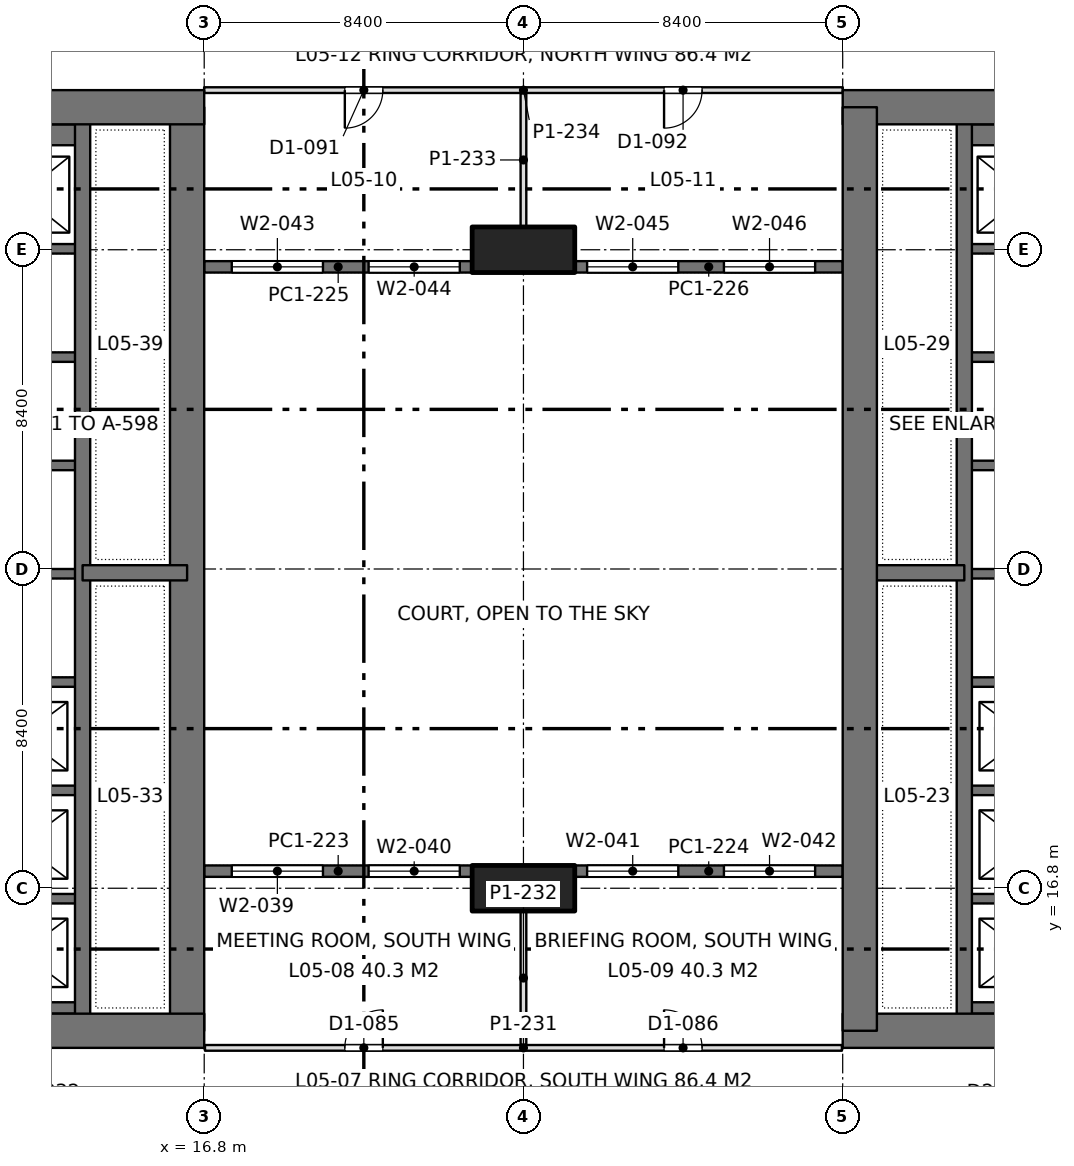
"""IFC4 building model, lengths in metres.
Left out: names, types, materials, properties, quantities, classifications, styles, units other than length and angle.
Written with IfcOpenShell. Run it as: python <this file> out.ifc"""

import sys

from ifc_helpers import new_model, si_unit, direction, frame, frame_2d, origin, origin_2d, place, context, subcontext, project, spatial, rectangle, extrude, element, fill, save


model = new_model("IFC4")
c1 = context("Model", 3, precision=1e-05, world=origin(), true_north=direction((0.0, 1.0)))
c2 = subcontext(c1, "Body", "Model", "MODEL_VIEW")
j1 = project(units=[si_unit("LENGTHUNIT", "METRE"), si_unit("PLANEANGLEUNIT", "RADIAN")], contexts=[c1])
p1 = place(None, origin())
s1 = spatial("IfcSite", under=j1, at=p1, CompositionType="ELEMENT")
p2 = place(p1, origin())
s2 = spatial("IfcBuilding", under=s1, at=p2, CompositionType="ELEMENT")
p3 = place(p2, frame((0.0, 0.0, 23.4)))
s3 = spatial("IfcBuildingStorey", under=s2, at=p3, CompositionType="ELEMENT", Elevation=23.4)
for number, where, z_axis, x_axis in (
    (1, (25.2, 16.8, 0.0), (0.0, 0.0, 1.0), (1.0, 0.0, 0.0)),
    (2, (25.2, 33.6, 0.0), (0.0, 0.0, 1.0), (1.0, 0.0, 0.0)),
):
    element("IfcColumn", number, at=place(p3, frame(where, z_axis=z_axis, x_axis=x_axis)), inside=s3, PredefinedType="COLUMN", context=c2, shape_type="SweptSolid", body=[
        extrude(rectangle(XDim=2.7, YDim=1.2, at=origin_2d()), origin(), (0.0, 0.0, 1.0), 4.5),
    ])
p4 = place(p3, frame((-1.2, 13.05, 0.0), z_axis=(0.0, 0.0, 1.0), x_axis=(1.0, 0.0, 0.0)))
e3 = element("IfcWall", 3, at=p4, inside=s3, PredefinedType="SHEAR", context=c2, shape_type="SweptSolid", body=[
    extrude(rectangle(XDim=18.0, YDim=0.9, at=frame_2d((9.0, 0.0))), origin(), (0.0, 0.0, 1.0), 4.5),
])
p5 = place(p4, frame((8.95, 0.0, 0.0)))
e4 = element("IfcOpeningElement", 4, at=p5, cuts=e3, PredefinedType="OPENING", context=c2, shape_type="SweptSolid", body=[
    extrude(rectangle(XDim=1.8, YDim=2.4, at=frame_2d((0.9, 1.2))), frame((0.0, 0.46, 0.0), z_axis=(0.0, -1.0, 0.0), x_axis=(1.0, 0.0, 0.0)), (0.0, 0.0, 1.0), 0.92),
])
p6 = place(p3, frame((-1.2, 37.35, 0.0), z_axis=(0.0, 0.0, 1.0), x_axis=(1.0, 0.0, 0.0)))
e5 = element("IfcWall", 5, at=p6, inside=s3, PredefinedType="SHEAR", context=c2, shape_type="SweptSolid", body=[
    extrude(rectangle(XDim=18.0, YDim=0.9, at=frame_2d((9.0, 0.0))), origin(), (0.0, 0.0, 1.0), 4.5),
])
p7 = place(p6, frame((8.95, 0.0, 0.0)))
e6 = element("IfcOpeningElement", 6, at=p7, cuts=e5, PredefinedType="OPENING", context=c2, shape_type="SweptSolid", body=[
    extrude(rectangle(XDim=1.8, YDim=2.4, at=frame_2d((0.9, 1.2))), frame((0.0, 0.46, 0.0), z_axis=(0.0, -1.0, 0.0), x_axis=(1.0, 0.0, 0.0)), (0.0, 0.0, 1.0), 0.92),
])
p8 = place(p3, frame((16.35, 13.05, 0.0), z_axis=(0.0, 0.0, 1.0), x_axis=(0.0, 1.0, 0.0)))
e7 = element("IfcWall", 7, at=p8, inside=s3, PredefinedType="SHEAR", context=c2, shape_type="SweptSolid", body=[
    extrude(rectangle(XDim=24.3, YDim=0.9, at=frame_2d((12.15, 0.0))), origin(), (0.0, 0.0, 1.0), 4.5),
])
p9 = place(p3, frame((13.6, 13.05, 0.0), z_axis=(0.0, 0.0, 1.0), x_axis=(0.0, 1.0, 0.0)))
e8 = element("IfcWall", 8, at=p9, inside=s3, PredefinedType="SHEAR", context=c2, shape_type="SweptSolid", body=[
    extrude(rectangle(XDim=24.3, YDim=0.4, at=frame_2d((12.15, 0.0))), origin(), (0.0, 0.0, 1.0), 4.5),
])
p10 = place(p3, frame((13.6, 25.1, 0.0), z_axis=(0.0, 0.0, 1.0), x_axis=(1.0, 0.0, 0.0)))
e9 = element("IfcWall", 9, at=p10, inside=s3, PredefinedType="SHEAR", context=c2, shape_type="SweptSolid", body=[
    extrude(rectangle(XDim=2.75, YDim=0.4, at=frame_2d((1.375, 0.0))), origin(), (0.0, 0.0, 1.0), 4.5),
])
p11 = place(p3, frame((10.4, 13.65, 0.0), z_axis=(0.0, 0.0, 1.0), x_axis=(1.0, 0.0, 0.0)))
e10 = element("IfcWall", 10, at=p11, inside=s3, PredefinedType="SHEAR", context=c2, shape_type="SweptSolid", body=[
    extrude(rectangle(XDim=3.2, YDim=0.3, at=frame_2d((1.6, 0.0))), origin(), (0.0, 0.0, 1.0), 4.5),
])
for number, where, z_axis, x_axis in (
    (11, (10.4, 16.525, 0.0), (0.0, 0.0, 1.0), (1.0, 0.0, 0.0)),
    (12, (10.4, 19.375, 0.0), (0.0, 0.0, 1.0), (1.0, 0.0, 0.0)),
    (13, (10.4, 22.225, 0.0), (0.0, 0.0, 1.0), (1.0, 0.0, 0.0)),
    (14, (10.4, 25.075, 0.0), (0.0, 0.0, 1.0), (1.0, 0.0, 0.0)),
    (15, (10.4, 27.925, 0.0), (0.0, 0.0, 1.0), (1.0, 0.0, 0.0)),
    (16, (10.4, 30.775, 0.0), (0.0, 0.0, 1.0), (1.0, 0.0, 0.0)),
    (17, (10.4, 33.625, 0.0), (0.0, 0.0, 1.0), (1.0, 0.0, 0.0)),
):
    element("IfcWall", number, at=place(p3, frame(where, z_axis=z_axis, x_axis=x_axis)), inside=s3, PredefinedType="SHEAR", context=c2, shape_type="SweptSolid", body=[
        extrude(rectangle(XDim=3.2, YDim=0.25, at=frame_2d((1.6, 0.0))), origin(), (0.0, 0.0, 1.0), 4.5),
    ])
p12 = place(p3, frame((10.4, 36.625, 0.0), z_axis=(0.0, 0.0, 1.0), x_axis=(1.0, 0.0, 0.0)))
e18 = element("IfcWall", 18, at=p12, inside=s3, PredefinedType="SHEAR", context=c2, shape_type="SweptSolid", body=[
    extrude(rectangle(XDim=3.2, YDim=0.55, at=frame_2d((1.6, 0.0))), origin(), (0.0, 0.0, 1.0), 4.5),
])
p13 = place(p3, frame((33.6, 13.05, 0.0), z_axis=(0.0, 0.0, 1.0), x_axis=(1.0, 0.0, 0.0)))
e19 = element("IfcWall", 19, at=p13, inside=s3, PredefinedType="SHEAR", context=c2, shape_type="SweptSolid", body=[
    extrude(rectangle(XDim=18.0, YDim=0.9, at=frame_2d((9.0, 0.0))), origin(), (0.0, 0.0, 1.0), 4.5),
])
p14 = place(p13, frame((7.25, 0.0, 0.0)))
e20 = element("IfcOpeningElement", 20, at=p14, cuts=e19, PredefinedType="OPENING", context=c2, shape_type="SweptSolid", body=[
    extrude(rectangle(XDim=1.8, YDim=2.4, at=frame_2d((0.9, 1.2))), frame((0.0, 0.46, 0.0), z_axis=(0.0, -1.0, 0.0), x_axis=(1.0, 0.0, 0.0)), (0.0, 0.0, 1.0), 0.92),
])
p15 = place(p3, frame((33.6, 37.35, 0.0), z_axis=(0.0, 0.0, 1.0), x_axis=(1.0, 0.0, 0.0)))
e21 = element("IfcWall", 21, at=p15, inside=s3, PredefinedType="SHEAR", context=c2, shape_type="SweptSolid", body=[
    extrude(rectangle(XDim=18.0, YDim=0.9, at=frame_2d((9.0, 0.0))), origin(), (0.0, 0.0, 1.0), 4.5),
])
p16 = place(p15, frame((7.25, 0.0, 0.0)))
e22 = element("IfcOpeningElement", 22, at=p16, cuts=e21, PredefinedType="OPENING", context=c2, shape_type="SweptSolid", body=[
    extrude(rectangle(XDim=1.8, YDim=2.4, at=frame_2d((0.9, 1.2))), frame((0.0, 0.46, 0.0), z_axis=(0.0, -1.0, 0.0), x_axis=(1.0, 0.0, 0.0)), (0.0, 0.0, 1.0), 0.92),
])
p17 = place(p3, frame((34.05, 13.05, 0.0), z_axis=(0.0, 0.0, 1.0), x_axis=(0.0, 1.0, 0.0)))
e23 = element("IfcWall", 23, at=p17, inside=s3, PredefinedType="SHEAR", context=c2, shape_type="SweptSolid", body=[
    extrude(rectangle(XDim=24.3, YDim=0.9, at=frame_2d((12.15, 0.0))), origin(), (0.0, 0.0, 1.0), 4.5),
])
p18 = place(p3, frame((36.8, 13.05, 0.0), z_axis=(0.0, 0.0, 1.0), x_axis=(0.0, 1.0, 0.0)))
e24 = element("IfcWall", 24, at=p18, inside=s3, PredefinedType="SHEAR", context=c2, shape_type="SweptSolid", body=[
    extrude(rectangle(XDim=24.3, YDim=0.4, at=frame_2d((12.15, 0.0))), origin(), (0.0, 0.0, 1.0), 4.5),
])
p19 = place(p3, frame((36.8, 25.1, 0.0), z_axis=(0.0, 0.0, 1.0), x_axis=(-1.0, 0.0, 0.0)))
e25 = element("IfcWall", 25, at=p19, inside=s3, PredefinedType="SHEAR", context=c2, shape_type="SweptSolid", body=[
    extrude(rectangle(XDim=2.75, YDim=0.4, at=frame_2d((1.375, 0.0))), origin(), (0.0, 0.0, 1.0), 4.5),
])
p20 = place(p3, frame((40.0, 13.65, 0.0), z_axis=(0.0, 0.0, 1.0), x_axis=(-1.0, 0.0, 0.0)))
e26 = element("IfcWall", 26, at=p20, inside=s3, PredefinedType="SHEAR", context=c2, shape_type="SweptSolid", body=[
    extrude(rectangle(XDim=3.2, YDim=0.3, at=frame_2d((1.6, 0.0))), origin(), (0.0, 0.0, 1.0), 4.5),
])
for number, where, z_axis, x_axis in (
    (27, (40.0, 16.525, 0.0), (0.0, 0.0, 1.0), (-1.0, 0.0, 0.0)),
    (28, (40.0, 19.375, 0.0), (0.0, 0.0, 1.0), (-1.0, 0.0, 0.0)),
    (29, (40.0, 22.225, 0.0), (0.0, 0.0, 1.0), (-1.0, 0.0, 0.0)),
    (30, (40.0, 25.075, 0.0), (0.0, 0.0, 1.0), (-1.0, 0.0, 0.0)),
    (31, (40.0, 27.925, 0.0), (0.0, 0.0, 1.0), (-1.0, 0.0, 0.0)),
    (32, (40.0, 30.775, 0.0), (0.0, 0.0, 1.0), (-1.0, 0.0, 0.0)),
    (33, (40.0, 33.625, 0.0), (0.0, 0.0, 1.0), (-1.0, 0.0, 0.0)),
):
    element("IfcWall", number, at=place(p3, frame(where, z_axis=z_axis, x_axis=x_axis)), inside=s3, PredefinedType="SHEAR", context=c2, shape_type="SweptSolid", body=[
        extrude(rectangle(XDim=3.2, YDim=0.25, at=frame_2d((1.6, 0.0))), origin(), (0.0, 0.0, 1.0), 4.5),
    ])
p21 = place(p3, frame((40.0, 36.625, 0.0), z_axis=(0.0, 0.0, 1.0), x_axis=(-1.0, 0.0, 0.0)))
e34 = element("IfcWall", 34, at=p21, inside=s3, PredefinedType="SHEAR", context=c2, shape_type="SweptSolid", body=[
    extrude(rectangle(XDim=3.2, YDim=0.55, at=frame_2d((1.6, 0.0))), origin(), (0.0, 0.0, 1.0), 4.5),
])
p22 = place(p3, frame((16.8, 17.25, 0.0), z_axis=(0.0, 0.0, 1.0), x_axis=(1.0, 0.0, 0.0)))
e35 = element("IfcWall", 35, at=p22, inside=s3, PredefinedType="SOLIDWALL", context=c2, shape_type="SweptSolid", body=[
    extrude(rectangle(XDim=7.05, YDim=0.3, at=frame_2d((3.525, 0.0))), origin(), (0.0, 0.0, 1.0), 4.34),
])
p23 = place(p22, frame((0.725, 0.0, 0.9)))
e36 = element("IfcOpeningElement", 36, at=p23, cuts=e35, PredefinedType="OPENING", context=c2, shape_type="SweptSolid", body=[
    extrude(rectangle(XDim=2.4, YDim=1.9, at=frame_2d((1.2, 0.95))), frame((0.0, 0.16, 0.0), z_axis=(0.0, -1.0, 0.0), x_axis=(1.0, 0.0, 0.0)), (0.0, 0.0, 1.0), 0.32),
])
p24 = place(p22, frame((4.325, 0.0, 0.9)))
e37 = element("IfcOpeningElement", 37, at=p24, cuts=e35, PredefinedType="OPENING", context=c2, shape_type="SweptSolid", body=[
    extrude(rectangle(XDim=2.4, YDim=1.9, at=frame_2d((1.2, 0.95))), frame((0.0, 0.16, 0.0), z_axis=(0.0, -1.0, 0.0), x_axis=(1.0, 0.0, 0.0)), (0.0, 0.0, 1.0), 0.32),
])
p25 = place(p3, frame((26.55, 17.25, 0.0), z_axis=(0.0, 0.0, 1.0), x_axis=(1.0, 0.0, 0.0)))
e38 = element("IfcWall", 38, at=p25, inside=s3, PredefinedType="SOLIDWALL", context=c2, shape_type="SweptSolid", body=[
    extrude(rectangle(XDim=7.05, YDim=0.3, at=frame_2d((3.525, 0.0))), origin(), (0.0, 0.0, 1.0), 4.34),
])
p26 = place(p25, frame((0.325, 0.0, 0.9)))
e39 = element("IfcOpeningElement", 39, at=p26, cuts=e38, PredefinedType="OPENING", context=c2, shape_type="SweptSolid", body=[
    extrude(rectangle(XDim=2.4, YDim=1.9, at=frame_2d((1.2, 0.95))), frame((0.0, 0.16, 0.0), z_axis=(0.0, -1.0, 0.0), x_axis=(1.0, 0.0, 0.0)), (0.0, 0.0, 1.0), 0.32),
])
p27 = place(p25, frame((3.925, 0.0, 0.9)))
e40 = element("IfcOpeningElement", 40, at=p27, cuts=e38, PredefinedType="OPENING", context=c2, shape_type="SweptSolid", body=[
    extrude(rectangle(XDim=2.4, YDim=1.9, at=frame_2d((1.2, 0.95))), frame((0.0, 0.16, 0.0), z_axis=(0.0, -1.0, 0.0), x_axis=(1.0, 0.0, 0.0)), (0.0, 0.0, 1.0), 0.32),
])
p28 = place(p3, frame((16.8, 33.15, 0.0), z_axis=(0.0, 0.0, 1.0), x_axis=(1.0, 0.0, 0.0)))
e41 = element("IfcWall", 41, at=p28, inside=s3, PredefinedType="SOLIDWALL", context=c2, shape_type="SweptSolid", body=[
    extrude(rectangle(XDim=7.05, YDim=0.3, at=frame_2d((3.525, 0.0))), origin(), (0.0, 0.0, 1.0), 4.34),
])
p29 = place(p28, frame((0.725, 0.0, 0.9)))
e42 = element("IfcOpeningElement", 42, at=p29, cuts=e41, PredefinedType="OPENING", context=c2, shape_type="SweptSolid", body=[
    extrude(rectangle(XDim=2.4, YDim=1.9, at=frame_2d((1.2, 0.95))), frame((0.0, 0.16, 0.0), z_axis=(0.0, -1.0, 0.0), x_axis=(1.0, 0.0, 0.0)), (0.0, 0.0, 1.0), 0.32),
])
p30 = place(p28, frame((4.325, 0.0, 0.9)))
e43 = element("IfcOpeningElement", 43, at=p30, cuts=e41, PredefinedType="OPENING", context=c2, shape_type="SweptSolid", body=[
    extrude(rectangle(XDim=2.4, YDim=1.9, at=frame_2d((1.2, 0.95))), frame((0.0, 0.16, 0.0), z_axis=(0.0, -1.0, 0.0), x_axis=(1.0, 0.0, 0.0)), (0.0, 0.0, 1.0), 0.32),
])
p31 = place(p3, frame((26.55, 33.15, 0.0), z_axis=(0.0, 0.0, 1.0), x_axis=(1.0, 0.0, 0.0)))
e44 = element("IfcWall", 44, at=p31, inside=s3, PredefinedType="SOLIDWALL", context=c2, shape_type="SweptSolid", body=[
    extrude(rectangle(XDim=7.05, YDim=0.3, at=frame_2d((3.525, 0.0))), origin(), (0.0, 0.0, 1.0), 4.34),
])
p32 = place(p31, frame((0.325, 0.0, 0.9)))
e45 = element("IfcOpeningElement", 45, at=p32, cuts=e44, PredefinedType="OPENING", context=c2, shape_type="SweptSolid", body=[
    extrude(rectangle(XDim=2.4, YDim=1.9, at=frame_2d((1.2, 0.95))), frame((0.0, 0.16, 0.0), z_axis=(0.0, -1.0, 0.0), x_axis=(1.0, 0.0, 0.0)), (0.0, 0.0, 1.0), 0.32),
])
p33 = place(p31, frame((3.925, 0.0, 0.9)))
e46 = element("IfcOpeningElement", 46, at=p33, cuts=e44, PredefinedType="OPENING", context=c2, shape_type="SweptSolid", body=[
    extrude(rectangle(XDim=2.4, YDim=1.9, at=frame_2d((1.2, 0.95))), frame((0.0, 0.16, 0.0), z_axis=(0.0, -1.0, 0.0), x_axis=(1.0, 0.0, 0.0)), (0.0, 0.0, 1.0), 0.32),
])
p34 = place(p3, frame((25.2, 12.674, 0.0), z_axis=(0.0, 0.0, 1.0), x_axis=(0.0, 1.0, 0.0)))
e47 = element("IfcWall", 47, at=p34, inside=s3, PredefinedType="PARTITIONING", context=c2, shape_type="SweptSolid", body=[
    extrude(rectangle(XDim=3.527, YDim=0.15, at=frame_2d((1.763, 0.0))), origin(), (0.0, 0.0, 1.0), 3.74),
])
p35 = place(p3, frame((16.82, 12.6, 0.0), z_axis=(0.0, 0.0, 1.0), x_axis=(1.0, 0.0, 0.0)))
e48 = element("IfcWall", 48, at=p35, inside=s3, PredefinedType="PARTITIONING", context=c2, shape_type="SweptSolid", body=[
    extrude(rectangle(XDim=16.76, YDim=0.15, at=frame_2d((8.38, 0.0))), origin(), (0.0, 0.0, 1.0), 3.74),
])
p36 = place(p35, frame((3.68, 0.0, 0.0)))
e49 = element("IfcOpeningElement", 49, at=p36, cuts=e48, PredefinedType="OPENING", context=c2, shape_type="SweptSolid", body=[
    extrude(rectangle(XDim=1.0, YDim=2.2, at=frame_2d((0.5, 1.1))), frame((0.0, 0.085, 0.0), z_axis=(0.0, -1.0, 0.0), x_axis=(1.0, 0.0, 0.0)), (0.0, 0.0, 1.0), 0.17),
])
p37 = place(p35, frame((12.08, 0.0, 0.0)))
e50 = element("IfcOpeningElement", 50, at=p37, cuts=e48, PredefinedType="OPENING", context=c2, shape_type="SweptSolid", body=[
    extrude(rectangle(XDim=1.0, YDim=2.2, at=frame_2d((0.5, 1.1))), frame((0.0, 0.085, 0.0), z_axis=(0.0, -1.0, 0.0), x_axis=(1.0, 0.0, 0.0)), (0.0, 0.0, 1.0), 0.17),
])
p38 = place(p3, frame((25.2, 34.199, 0.0), z_axis=(0.0, 0.0, 1.0), x_axis=(0.0, 1.0, 0.0)))
e51 = element("IfcWall", 51, at=p38, inside=s3, PredefinedType="PARTITIONING", context=c2, shape_type="SweptSolid", body=[
    extrude(rectangle(XDim=3.527, YDim=0.15, at=frame_2d((1.764, 0.0))), origin(), (0.0, 0.0, 1.0), 3.74),
])
p39 = place(p3, frame((16.798, 37.8, 0.0), z_axis=(0.0, 0.0, 1.0), x_axis=(1.0, 0.0, 0.0)))
e52 = element("IfcWall", 52, at=p39, inside=s3, PredefinedType="PARTITIONING", context=c2, shape_type="SweptSolid", body=[
    extrude(rectangle(XDim=16.804, YDim=0.15, at=frame_2d((8.402, 0.0))), origin(), (0.0, 0.0, 1.0), 3.74),
])
p40 = place(p39, frame((3.702, 0.0, 0.0)))
e53 = element("IfcOpeningElement", 53, at=p40, cuts=e52, PredefinedType="OPENING", context=c2, shape_type="SweptSolid", body=[
    extrude(rectangle(XDim=1.0, YDim=2.2, at=frame_2d((0.5, 1.1))), frame((0.0, 0.085, 0.0), z_axis=(0.0, -1.0, 0.0), x_axis=(1.0, 0.0, 0.0)), (0.0, 0.0, 1.0), 0.17),
])
p41 = place(p39, frame((12.102, 0.0, 0.0)))
e54 = element("IfcOpeningElement", 54, at=p41, cuts=e52, PredefinedType="OPENING", context=c2, shape_type="SweptSolid", body=[
    extrude(rectangle(XDim=1.0, YDim=2.2, at=frame_2d((0.5, 1.1))), frame((0.0, 0.085, 0.0), z_axis=(0.0, -1.0, 0.0), x_axis=(1.0, 0.0, 0.0)), (0.0, 0.0, 1.0), 0.17),
])
p42 = place(p23, origin())
e55 = element("IfcWindow", 55, at=p42, inside=s3, PartitioningType="SINGLE_PANEL", PredefinedType="WINDOW", context=c2, shape_type="SweptSolid", body=[
    extrude(rectangle(XDim=2.4, YDim=1.9, at=frame_2d((1.2, 0.95))), frame((0.0, 0.03, 0.0), z_axis=(0.0, -1.0, 0.0), x_axis=(1.0, 0.0, 0.0)), (0.0, 0.0, 1.0), 0.06),
])
fill(e36, e55)
p43 = place(p24, origin())
e56 = element("IfcWindow", 56, at=p43, inside=s3, PartitioningType="SINGLE_PANEL", PredefinedType="WINDOW", context=c2, shape_type="SweptSolid", body=[
    extrude(rectangle(XDim=2.4, YDim=1.9, at=frame_2d((1.2, 0.95))), frame((0.0, 0.03, 0.0), z_axis=(0.0, -1.0, 0.0), x_axis=(1.0, 0.0, 0.0)), (0.0, 0.0, 1.0), 0.06),
])
fill(e37, e56)
p44 = place(p26, origin())
e57 = element("IfcWindow", 57, at=p44, inside=s3, PartitioningType="SINGLE_PANEL", PredefinedType="WINDOW", context=c2, shape_type="SweptSolid", body=[
    extrude(rectangle(XDim=2.4, YDim=1.9, at=frame_2d((1.2, 0.95))), frame((0.0, 0.03, 0.0), z_axis=(0.0, -1.0, 0.0), x_axis=(1.0, 0.0, 0.0)), (0.0, 0.0, 1.0), 0.06),
])
fill(e39, e57)
p45 = place(p27, origin())
e58 = element("IfcWindow", 58, at=p45, inside=s3, PartitioningType="SINGLE_PANEL", PredefinedType="WINDOW", context=c2, shape_type="SweptSolid", body=[
    extrude(rectangle(XDim=2.4, YDim=1.9, at=frame_2d((1.2, 0.95))), frame((0.0, 0.03, 0.0), z_axis=(0.0, -1.0, 0.0), x_axis=(1.0, 0.0, 0.0)), (0.0, 0.0, 1.0), 0.06),
])
fill(e40, e58)
p46 = place(p29, origin())
e59 = element("IfcWindow", 59, at=p46, inside=s3, PartitioningType="SINGLE_PANEL", PredefinedType="WINDOW", context=c2, shape_type="SweptSolid", body=[
    extrude(rectangle(XDim=2.4, YDim=1.9, at=frame_2d((1.2, 0.95))), frame((0.0, 0.03, 0.0), z_axis=(0.0, -1.0, 0.0), x_axis=(1.0, 0.0, 0.0)), (0.0, 0.0, 1.0), 0.06),
])
fill(e42, e59)
p47 = place(p30, origin())
e60 = element("IfcWindow", 60, at=p47, inside=s3, PartitioningType="SINGLE_PANEL", PredefinedType="WINDOW", context=c2, shape_type="SweptSolid", body=[
    extrude(rectangle(XDim=2.4, YDim=1.9, at=frame_2d((1.2, 0.95))), frame((0.0, 0.03, 0.0), z_axis=(0.0, -1.0, 0.0), x_axis=(1.0, 0.0, 0.0)), (0.0, 0.0, 1.0), 0.06),
])
fill(e43, e60)
p48 = place(p32, origin())
e61 = element("IfcWindow", 61, at=p48, inside=s3, PartitioningType="SINGLE_PANEL", PredefinedType="WINDOW", context=c2, shape_type="SweptSolid", body=[
    extrude(rectangle(XDim=2.4, YDim=1.9, at=frame_2d((1.2, 0.95))), frame((0.0, 0.03, 0.0), z_axis=(0.0, -1.0, 0.0), x_axis=(1.0, 0.0, 0.0)), (0.0, 0.0, 1.0), 0.06),
])
fill(e45, e61)
p49 = place(p33, origin())
e62 = element("IfcWindow", 62, at=p49, inside=s3, PartitioningType="SINGLE_PANEL", PredefinedType="WINDOW", context=c2, shape_type="SweptSolid", body=[
    extrude(rectangle(XDim=2.4, YDim=1.9, at=frame_2d((1.2, 0.95))), frame((0.0, 0.03, 0.0), z_axis=(0.0, -1.0, 0.0), x_axis=(1.0, 0.0, 0.0)), (0.0, 0.0, 1.0), 0.06),
])
fill(e46, e62)
p50 = place(p36, origin())
e63 = element("IfcDoor", 63, at=p50, inside=s3, OperationType="SINGLE_SWING_RIGHT", PredefinedType="DOOR", context=c2, shape_type="SweptSolid", body=[
    extrude(rectangle(XDim=1.0, YDim=2.2, at=frame_2d((0.5, 1.1))), frame((0.0, 0.025, 0.0), z_axis=(0.0, -1.0, 0.0), x_axis=(1.0, 0.0, 0.0)), (0.0, 0.0, 1.0), 0.05),
])
fill(e49, e63)
p51 = place(p37, origin())
e64 = element("IfcDoor", 64, at=p51, inside=s3, OperationType="SINGLE_SWING_LEFT", PredefinedType="DOOR", context=c2, shape_type="SweptSolid", body=[
    extrude(rectangle(XDim=1.0, YDim=2.2, at=frame_2d((0.5, 1.1))), frame((0.0, 0.025, 0.0), z_axis=(0.0, -1.0, 0.0), x_axis=(1.0, 0.0, 0.0)), (0.0, 0.0, 1.0), 0.05),
])
fill(e50, e64)
p52 = place(p40, frame((1.0, 0.0, 0.0), z_axis=(0.0, 0.0, 1.0), x_axis=(-1.0, 0.0, 0.0)))
e65 = element("IfcDoor", 65, at=p52, inside=s3, OperationType="SINGLE_SWING_RIGHT", PredefinedType="DOOR", context=c2, shape_type="SweptSolid", body=[
    extrude(rectangle(XDim=1.0, YDim=2.2, at=frame_2d((0.5, 1.1))), frame((0.0, 0.025, 0.0), z_axis=(0.0, -1.0, 0.0), x_axis=(1.0, 0.0, 0.0)), (0.0, 0.0, 1.0), 0.05),
])
fill(e53, e65)
p53 = place(p41, frame((1.0, 0.0, 0.0), z_axis=(0.0, 0.0, 1.0), x_axis=(-1.0, 0.0, 0.0)))
e66 = element("IfcDoor", 66, at=p53, inside=s3, OperationType="SINGLE_SWING_RIGHT", PredefinedType="DOOR", context=c2, shape_type="SweptSolid", body=[
    extrude(rectangle(XDim=1.0, YDim=2.2, at=frame_2d((0.5, 1.1))), frame((0.0, 0.025, 0.0), z_axis=(0.0, -1.0, 0.0), x_axis=(1.0, 0.0, 0.0)), (0.0, 0.0, 1.0), 0.05),
])
fill(e54, e66)
save(model, sys.argv[1])
